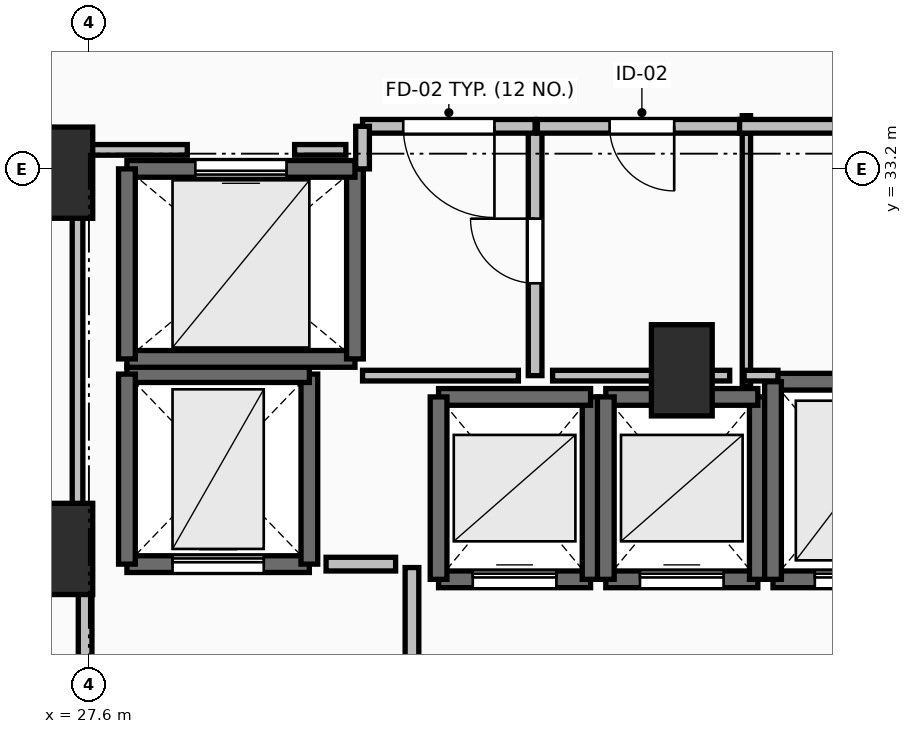
"""IFC4 building model, lengths in metres.
Left out: names, types, materials, properties, quantities, classifications, styles, units other than length and angle.
Written with IfcOpenShell. Run it as: python <this file> out.ifc"""

import sys

from ifc_helpers import new_model, si_unit, direction, frame, frame_2d, origin, origin_2d, place, context, subcontext, project, spatial, rectangle, extrude, element, fill, save


model = new_model("IFC4")
c1 = context("Model", 3, precision=1e-05, world=origin(), true_north=direction((0.0, 1.0)))
c2 = subcontext(c1, "Body", "Model", "MODEL_VIEW")
j1 = project(units=[si_unit("LENGTHUNIT", "METRE"), si_unit("PLANEANGLEUNIT", "RADIAN")], contexts=[c1])
p1 = place(None, origin())
s1 = spatial("IfcSite", under=j1, at=p1, CompositionType="ELEMENT")
p2 = place(p1, origin())
s2 = spatial("IfcBuilding", under=s1, at=p2, CompositionType="ELEMENT")
p3 = place(p2, frame((0.0, 0.0, 19.2)))
s3 = spatial("IfcBuildingStorey", under=s2, at=p3, CompositionType="ELEMENT", Elevation=19.2)
for number, where, z_axis, x_axis in (
    (1, (27.25, 28.2, 0.0), (0.0, 0.0, 1.0), (1.0, 0.0, 0.0)),
    (2, (27.25, 33.15, 0.0), (0.0, 0.0, 1.0), (1.0, 0.0, 0.0)),
    (3, (35.4, 30.55, 0.0), (0.0, 0.0, 1.0), (1.0, 0.0, 0.0)),
):
    element("IfcColumn", number, at=place(p3, frame(where, z_axis=z_axis, x_axis=x_axis)), inside=s3, PredefinedType="PILASTER", context=c2, shape_type="SweptSolid", body=[
        extrude(rectangle(XDim=0.8, YDim=1.2, at=origin_2d()), origin(), (0.0, 0.0, 1.0), 4.8),
    ])
p4 = place(p3, frame((32.2, 27.8, 0.0), z_axis=(0.0, 0.0, 1.0), x_axis=(1.0, 0.0, 0.0)))
e4 = element("IfcWall", 4, at=p4, inside=s3, PredefinedType="SOLIDWALL", context=c2, shape_type="SweptSolid", body=[
    extrude(rectangle(XDim=2.0, YDim=0.22, at=frame_2d((1.0, 0.0))), origin(), (0.0, 0.0, 1.0), 4.54),
])
p5 = place(p4, frame((0.45, 0.0, 0.0)))
e5 = element("IfcOpeningElement", 5, at=p5, cuts=e4, PredefinedType="OPENING", context=c2, shape_type="SweptSolid", body=[
    extrude(rectangle(XDim=1.1, YDim=2.2, at=frame_2d((0.55, 1.1))), frame((0.0, 0.125, 0.0), z_axis=(0.0, -1.0, 0.0), x_axis=(1.0, 0.0, 0.0)), (0.0, 0.0, 1.0), 0.25),
])
p6 = place(p3, frame((34.2, 27.8, 0.0), z_axis=(0.0, 0.0, 1.0), x_axis=(0.0, 1.0, 0.0)))
e6 = element("IfcWall", 6, at=p6, inside=s3, PredefinedType="SOLIDWALL", context=c2, shape_type="SweptSolid", body=[
    extrude(rectangle(XDim=2.4, YDim=0.22, at=frame_2d((1.2, 0.0))), origin(), (0.0, 0.0, 1.0), 4.54),
])
p7 = place(p3, frame((34.2, 30.2, 0.0), z_axis=(0.0, 0.0, 1.0), x_axis=(-1.0, 0.0, 0.0)))
e7 = element("IfcWall", 7, at=p7, inside=s3, PredefinedType="SOLIDWALL", context=c2, shape_type="SweptSolid", body=[
    extrude(rectangle(XDim=2.0, YDim=0.22, at=frame_2d((1.0, 0.0))), origin(), (0.0, 0.0, 1.0), 4.54),
])
p8 = place(p3, frame((32.2, 30.2, 0.0), z_axis=(0.0, 0.0, 1.0), x_axis=(0.0, -1.0, 0.0)))
e8 = element("IfcWall", 8, at=p8, inside=s3, PredefinedType="SOLIDWALL", context=c2, shape_type="SweptSolid", body=[
    extrude(rectangle(XDim=2.4, YDim=0.22, at=frame_2d((1.2, 0.0))), origin(), (0.0, 0.0, 1.0), 4.54),
])
p9 = place(p3, frame((34.4, 27.8, 0.0), z_axis=(0.0, 0.0, 1.0), x_axis=(1.0, 0.0, 0.0)))
e9 = element("IfcWall", 9, at=p9, inside=s3, PredefinedType="SOLIDWALL", context=c2, shape_type="SweptSolid", body=[
    extrude(rectangle(XDim=2.0, YDim=0.22, at=frame_2d((1.0, 0.0))), origin(), (0.0, 0.0, 1.0), 4.54),
])
p10 = place(p9, frame((0.45, 0.0, 0.0)))
e10 = element("IfcOpeningElement", 10, at=p10, cuts=e9, PredefinedType="OPENING", context=c2, shape_type="SweptSolid", body=[
    extrude(rectangle(XDim=1.1, YDim=2.2, at=frame_2d((0.55, 1.1))), frame((0.0, 0.125, 0.0), z_axis=(0.0, -1.0, 0.0), x_axis=(1.0, 0.0, 0.0)), (0.0, 0.0, 1.0), 0.25),
])
p11 = place(p3, frame((36.4, 27.8, 0.0), z_axis=(0.0, 0.0, 1.0), x_axis=(0.0, 1.0, 0.0)))
e11 = element("IfcWall", 11, at=p11, inside=s3, PredefinedType="SOLIDWALL", context=c2, shape_type="SweptSolid", body=[
    extrude(rectangle(XDim=2.4, YDim=0.22, at=frame_2d((1.2, 0.0))), origin(), (0.0, 0.0, 1.0), 4.54),
])
p12 = place(p3, frame((36.4, 30.2, 0.0), z_axis=(0.0, 0.0, 1.0), x_axis=(-1.0, 0.0, 0.0)))
e12 = element("IfcWall", 12, at=p12, inside=s3, PredefinedType="SOLIDWALL", context=c2, shape_type="SweptSolid", body=[
    extrude(rectangle(XDim=2.0, YDim=0.22, at=frame_2d((1.0, 0.0))), origin(), (0.0, 0.0, 1.0), 4.54),
])
p13 = place(p3, frame((34.4, 30.2, 0.0), z_axis=(0.0, 0.0, 1.0), x_axis=(0.0, -1.0, 0.0)))
e13 = element("IfcWall", 13, at=p13, inside=s3, PredefinedType="SOLIDWALL", context=c2, shape_type="SweptSolid", body=[
    extrude(rectangle(XDim=2.4, YDim=0.22, at=frame_2d((1.2, 0.0))), origin(), (0.0, 0.0, 1.0), 4.54),
])
p14 = place(p3, frame((36.6, 27.8, 0.0), z_axis=(0.0, 0.0, 1.0), x_axis=(1.0, 0.0, 0.0)))
e14 = element("IfcWall", 14, at=p14, inside=s3, PredefinedType="SOLIDWALL", context=c2, shape_type="SweptSolid", body=[
    extrude(rectangle(XDim=2.2, YDim=0.22, at=frame_2d((1.1, 0.0))), origin(), (0.0, 0.0, 1.0), 4.54),
])
p15 = place(p14, frame((0.55, 0.0, 0.0)))
e15 = element("IfcOpeningElement", 15, at=p15, cuts=e14, PredefinedType="OPENING", context=c2, shape_type="SweptSolid", body=[
    extrude(rectangle(XDim=1.1, YDim=2.2, at=frame_2d((0.55, 1.1))), frame((0.0, 0.125, 0.0), z_axis=(0.0, -1.0, 0.0), x_axis=(1.0, 0.0, 0.0)), (0.0, 0.0, 1.0), 0.25),
])
p16 = place(p3, frame((38.8, 30.4, 0.0), z_axis=(0.0, 0.0, 1.0), x_axis=(-1.0, 0.0, 0.0)))
e16 = element("IfcWall", 16, at=p16, inside=s3, PredefinedType="SOLIDWALL", context=c2, shape_type="SweptSolid", body=[
    extrude(rectangle(XDim=2.2, YDim=0.22, at=frame_2d((1.1, 0.0))), origin(), (0.0, 0.0, 1.0), 4.54),
])
p17 = place(p3, frame((36.6, 30.4, 0.0), z_axis=(0.0, 0.0, 1.0), x_axis=(0.0, -1.0, 0.0)))
e17 = element("IfcWall", 17, at=p17, inside=s3, PredefinedType="SOLIDWALL", context=c2, shape_type="SweptSolid", body=[
    extrude(rectangle(XDim=2.6, YDim=0.22, at=frame_2d((1.3, 0.0))), origin(), (0.0, 0.0, 1.0), 4.54),
])
p18 = place(p3, frame((28.1, 28.0, 0.0), z_axis=(0.0, 0.0, 1.0), x_axis=(1.0, 0.0, 0.0)))
e18 = element("IfcWall", 18, at=p18, inside=s3, PredefinedType="SHEAR", context=c2, shape_type="SweptSolid", body=[
    extrude(rectangle(XDim=2.4, YDim=0.22, at=frame_2d((1.2, 0.0))), origin(), (0.0, 0.0, 1.0), 4.54),
])
p19 = place(p18, frame((0.6, 0.0, 0.0)))
e19 = element("IfcOpeningElement", 19, at=p19, cuts=e18, PredefinedType="OPENING", context=c2, shape_type="SweptSolid", body=[
    extrude(rectangle(XDim=1.2, YDim=2.2, at=frame_2d((0.6, 1.1))), frame((0.0, 0.125, 0.0), z_axis=(0.0, -1.0, 0.0), x_axis=(1.0, 0.0, 0.0)), (0.0, 0.0, 1.0), 0.25),
])
p20 = place(p3, frame((30.5, 28.0, 0.0), z_axis=(0.0, 0.0, 1.0), x_axis=(0.0, 1.0, 0.0)))
e20 = element("IfcWall", 20, at=p20, inside=s3, PredefinedType="SHEAR", context=c2, shape_type="SweptSolid", body=[
    extrude(rectangle(XDim=2.5, YDim=0.22, at=frame_2d((1.25, 0.0))), origin(), (0.0, 0.0, 1.0), 4.54),
])
p21 = place(p3, frame((30.5, 30.5, 0.0), z_axis=(0.0, 0.0, 1.0), x_axis=(-1.0, 0.0, 0.0)))
e21 = element("IfcWall", 21, at=p21, inside=s3, PredefinedType="SHEAR", context=c2, shape_type="SweptSolid", body=[
    extrude(rectangle(XDim=2.4, YDim=0.22, at=frame_2d((1.2, 0.0))), origin(), (0.0, 0.0, 1.0), 4.54),
])
p22 = place(p3, frame((28.1, 30.5, 0.0), z_axis=(0.0, 0.0, 1.0), x_axis=(0.0, -1.0, 0.0)))
e22 = element("IfcWall", 22, at=p22, inside=s3, PredefinedType="SHEAR", context=c2, shape_type="SweptSolid", body=[
    extrude(rectangle(XDim=2.5, YDim=0.22, at=frame_2d((1.25, 0.0))), origin(), (0.0, 0.0, 1.0), 4.54),
])
p23 = place(p3, frame((28.1, 30.7, 0.0), z_axis=(0.0, 0.0, 1.0), x_axis=(1.0, 0.0, 0.0)))
e23 = element("IfcWall", 23, at=p23, inside=s3, PredefinedType="SOLIDWALL", context=c2, shape_type="SweptSolid", body=[
    extrude(rectangle(XDim=3.0, YDim=0.22, at=frame_2d((1.5, 0.0))), origin(), (0.0, 0.0, 1.0), 4.54),
])
p24 = place(p3, frame((31.1, 30.7, 0.0), z_axis=(0.0, 0.0, 1.0), x_axis=(0.0, 1.0, 0.0)))
e24 = element("IfcWall", 24, at=p24, inside=s3, PredefinedType="SOLIDWALL", context=c2, shape_type="SweptSolid", body=[
    extrude(rectangle(XDim=2.5, YDim=0.22, at=frame_2d((1.25, 0.0))), origin(), (0.0, 0.0, 1.0), 4.54),
])
p25 = place(p3, frame((31.1, 33.2, 0.0), z_axis=(0.0, 0.0, 1.0), x_axis=(-1.0, 0.0, 0.0)))
e25 = element("IfcWall", 25, at=p25, inside=s3, PredefinedType="SOLIDWALL", context=c2, shape_type="SweptSolid", body=[
    extrude(rectangle(XDim=3.0, YDim=0.22, at=frame_2d((1.5, 0.0))), origin(), (0.0, 0.0, 1.0), 4.54),
])
p26 = place(p25, frame((0.9, 0.0, 0.0)))
e26 = element("IfcOpeningElement", 26, at=p26, cuts=e25, PredefinedType="OPENING", context=c2, shape_type="SweptSolid", body=[
    extrude(rectangle(XDim=1.2, YDim=2.2, at=frame_2d((0.6, 1.1))), frame((0.0, 0.125, 0.0), z_axis=(0.0, -1.0, 0.0), x_axis=(1.0, 0.0, 0.0)), (0.0, 0.0, 1.0), 0.25),
])
p27 = place(p3, frame((28.1, 33.2, 0.0), z_axis=(0.0, 0.0, 1.0), x_axis=(0.0, -1.0, 0.0)))
e27 = element("IfcWall", 27, at=p27, inside=s3, PredefinedType="SOLIDWALL", context=c2, shape_type="SweptSolid", body=[
    extrude(rectangle(XDim=2.5, YDim=0.22, at=frame_2d((1.25, 0.0))), origin(), (0.0, 0.0, 1.0), 4.54),
])
p28 = place(p3, frame((31.85, 24.045, 0.0), z_axis=(0.0, 0.0, 1.0), x_axis=(0.0, 1.0, 0.0)))
e28 = element("IfcWall", 28, at=p28, inside=s3, PredefinedType="PARTITIONING", context=c2, shape_type="SweptSolid", body=[
    extrude(rectangle(XDim=3.91, YDim=0.18, at=frame_2d((1.955, 0.0))), origin(), (0.0, 0.0, 1.0), 4.54),
])
p29 = place(p28, frame((1.355, 0.0, 0.0)))
e29 = element("IfcOpeningElement", 29, at=p29, cuts=e28, PredefinedType="OPENING", context=c2, shape_type="SweptSolid", body=[
    extrude(rectangle(XDim=1.2, YDim=2.15, at=frame_2d((0.6, 1.075))), frame((0.0, 0.105, 0.0), z_axis=(0.0, -1.0, 0.0), x_axis=(1.0, 0.0, 0.0)), (0.0, 0.0, 1.0), 0.21),
])
p30 = place(p3, frame((27.55, 28.0, 0.0), z_axis=(0.0, 0.0, 1.0), x_axis=(0.0, -1.0, 0.0)))
e30 = element("IfcWall", 30, at=p30, inside=s3, PredefinedType="PARTITIONING", context=c2, shape_type="SweptSolid", body=[
    extrude(rectangle(XDim=4.05, YDim=0.18, at=frame_2d((2.025, 0.0))), origin(), (0.0, 0.0, 1.0), 4.54),
])
p31 = place(p30, frame((1.425, 0.0, 0.0)))
e31 = element("IfcOpeningElement", 31, at=p31, cuts=e30, PredefinedType="OPENING", context=c2, shape_type="SweptSolid", body=[
    extrude(rectangle(XDim=1.2, YDim=2.15, at=frame_2d((0.6, 1.075))), frame((0.0, 0.105, 0.0), z_axis=(0.0, -1.0, 0.0), x_axis=(1.0, 0.0, 0.0)), (0.0, 0.0, 1.0), 0.21),
])
p32 = place(p3, frame((33.47, 30.48, 0.0), z_axis=(0.0, 0.0, 1.0), x_axis=(0.0, 1.0, 0.0)))
e32 = element("IfcWall", 32, at=p32, inside=s3, PredefinedType="PARTITIONING", context=c2, shape_type="SweptSolid", body=[
    extrude(rectangle(XDim=3.28, YDim=0.18, at=frame_2d((1.64, 0.0))), origin(), (0.0, 0.0, 1.0), 4.54),
])
p33 = place(p32, frame((1.215, 0.0, 0.0)))
e33 = element("IfcOpeningElement", 33, at=p33, cuts=e32, PredefinedType="OPENING", context=c2, shape_type="SweptSolid", body=[
    extrude(rectangle(XDim=0.85, YDim=2.1, at=frame_2d((0.425, 1.05))), frame((0.0, 0.105, 0.0), z_axis=(0.0, -1.0, 0.0), x_axis=(1.0, 0.0, 0.0)), (0.0, 0.0, 1.0), 0.21),
])
p34 = place(p3, frame((33.47, 33.76, 0.0), z_axis=(0.0, 0.0, 1.0), x_axis=(-1.0, 0.0, 0.0)))
e34 = element("IfcWall", 34, at=p34, inside=s3, PredefinedType="PARTITIONING", context=c2, shape_type="SweptSolid", body=[
    extrude(rectangle(XDim=2.27, YDim=0.18, at=frame_2d((1.135, 0.0))), origin(), (0.0, 0.0, 1.0), 4.54),
])
p35 = place(p34, frame((0.535, 0.0, 0.0)))
e35 = element("IfcOpeningElement", 35, at=p35, cuts=e34, PredefinedType="OPENING", context=c2, shape_type="SweptSolid", body=[
    extrude(rectangle(XDim=1.2, YDim=2.15, at=frame_2d((0.6, 1.075))), frame((0.0, 0.105, 0.0), z_axis=(0.0, -1.0, 0.0), x_axis=(1.0, 0.0, 0.0)), (0.0, 0.0, 1.0), 0.21),
])
p36 = place(p3, frame((31.2, 33.76, 0.0), z_axis=(0.0, 0.0, 1.0), x_axis=(0.0, -1.0, 0.0)))
e36 = element("IfcWall", 36, at=p36, inside=s3, PredefinedType="PARTITIONING", context=c2, shape_type="SweptSolid", body=[
    extrude(rectangle(XDim=0.56, YDim=0.18, at=frame_2d((0.28, 0.0))), origin(), (0.0, 0.0, 1.0), 4.54),
])
p37 = place(p3, frame((36.25, 30.34, 0.0), z_axis=(0.0, 0.0, 1.0), x_axis=(0.0, 1.0, 0.0)))
e37 = element("IfcWall", 37, at=p37, inside=s3, PredefinedType="PARTITIONING", context=c2, shape_type="SweptSolid", body=[
    extrude(rectangle(XDim=3.56, YDim=0.11, at=frame_2d((1.78, 0.0))), origin(), (0.0, 0.0, 1.0), 3.732),
])
p38 = place(p3, frame((36.25, 33.76, 0.0), z_axis=(0.0, 0.0, 1.0), x_axis=(-1.0, 0.0, 0.0)))
e38 = element("IfcWall", 38, at=p38, inside=s3, PredefinedType="PARTITIONING", context=c2, shape_type="SweptSolid", body=[
    extrude(rectangle(XDim=2.75, YDim=0.18, at=frame_2d((1.375, 0.0))), origin(), (0.0, 0.0, 1.0), 4.54),
])
p39 = place(p38, frame((0.95, 0.0, 0.0)))
e39 = element("IfcOpeningElement", 39, at=p39, cuts=e38, PredefinedType="OPENING", context=c2, shape_type="SweptSolid", body=[
    extrude(rectangle(XDim=0.85, YDim=2.1, at=frame_2d((0.425, 1.05))), frame((0.0, 0.105, 0.0), z_axis=(0.0, -1.0, 0.0), x_axis=(1.0, 0.0, 0.0)), (0.0, 0.0, 1.0), 0.21),
])
p40 = place(p3, frame((39.79, 33.76, 0.0), z_axis=(0.0, 0.0, 1.0), x_axis=(-1.0, 0.0, 0.0)))
e40 = element("IfcWall", 40, at=p40, inside=s3, PredefinedType="PARTITIONING", context=c2, shape_type="SweptSolid", body=[
    extrude(rectangle(XDim=3.63, YDim=0.18, at=frame_2d((1.815, 0.0))), origin(), (0.0, 0.0, 1.0), 4.54),
])
p41 = place(p40, frame((1.39, 0.0, 0.0)))
e41 = element("IfcOpeningElement", 41, at=p41, cuts=e40, PredefinedType="OPENING", context=c2, shape_type="SweptSolid", body=[
    extrude(rectangle(XDim=0.85, YDim=2.1, at=frame_2d((0.425, 1.05))), frame((0.0, 0.105, 0.0), z_axis=(0.0, -1.0, 0.0), x_axis=(1.0, 0.0, 0.0)), (0.0, 0.0, 1.0), 0.21),
])
p42 = place(p3, frame((31.635, 28.0, 0.0), z_axis=(0.0, 0.0, 1.0), x_axis=(-1.0, 0.0, 0.0)))
e42 = element("IfcWall", 42, at=p42, inside=s3, PredefinedType="PARTITIONING", context=c2, shape_type="SweptSolid", body=[
    extrude(rectangle(XDim=0.915, YDim=0.18, at=frame_2d((0.458, 0.0))), origin(), (0.0, 0.0, 1.0), 4.54),
])
p43 = place(p3, frame((31.2, 30.48, 0.0), z_axis=(0.0, 0.0, 1.0), x_axis=(1.0, 0.0, 0.0)))
e43 = element("IfcWall", 43, at=p43, inside=s3, PredefinedType="PARTITIONING", context=c2, shape_type="SweptSolid", body=[
    extrude(rectangle(XDim=2.05, YDim=0.14, at=frame_2d((1.025, 0.0))), origin(), (0.0, 0.0, 1.0), 4.54),
])
p44 = place(p3, frame((33.7, 30.48, 0.0), z_axis=(0.0, 0.0, 1.0), x_axis=(1.0, 0.0, 0.0)))
e44 = element("IfcWall", 44, at=p44, inside=s3, PredefinedType="PARTITIONING", context=c2, shape_type="SweptSolid", body=[
    extrude(rectangle(XDim=2.33, YDim=0.14, at=frame_2d((1.165, 0.0))), origin(), (0.0, 0.0, 1.0), 3.732),
])
p45 = place(p3, frame((36.22, 30.48, 0.0), z_axis=(0.0, 0.0, 1.0), x_axis=(1.0, 0.0, 0.0)))
e45 = element("IfcWall", 45, at=p45, inside=s3, PredefinedType="PARTITIONING", context=c2, shape_type="SweptSolid", body=[
    extrude(rectangle(XDim=0.445, YDim=0.14, at=frame_2d((0.223, 0.0))), origin(), (0.0, 0.0, 1.0), 3.732),
])
p46 = place(p3, frame((27.45, 28.196, 0.0), z_axis=(0.0, 0.0, 1.0), x_axis=(0.0, 1.0, 0.0)))
e46 = element("IfcWall", 46, at=p46, inside=s3, PredefinedType="PARTITIONING", context=c2, shape_type="SweptSolid", body=[
    extrude(rectangle(XDim=5.254, YDim=0.14, at=frame_2d((2.627, 0.0))), origin(), (0.0, 0.0, 1.0), 3.732),
])
p47 = place(p3, frame((27.45, 33.45, 0.0), z_axis=(0.0, 0.0, 1.0), x_axis=(1.0, 0.0, 0.0)))
e47 = element("IfcWall", 47, at=p47, inside=s3, PredefinedType="PARTITIONING", context=c2, shape_type="SweptSolid", body=[
    extrude(rectangle(XDim=1.444, YDim=0.14, at=frame_2d((0.722, 0.0))), origin(), (0.0, 0.0, 1.0), 3.732),
])
p48 = place(p3, frame((30.306, 33.45, 0.0), z_axis=(0.0, 0.0, 1.0), x_axis=(1.0, 0.0, 0.0)))
e48 = element("IfcWall", 48, at=p48, inside=s3, PredefinedType="PARTITIONING", context=c2, shape_type="SweptSolid", body=[
    extrude(rectangle(XDim=0.674, YDim=0.14, at=frame_2d((0.337, 0.0))), origin(), (0.0, 0.0, 1.0), 4.54),
])
p49 = place(p5, origin())
e49 = element("IfcDoor", 49, at=p49, inside=s3, OperationType="SLIDING_TO_LEFT", PredefinedType="DOOR", context=c2, shape_type="SweptSolid", body=[
    extrude(rectangle(XDim=1.1, YDim=2.2, at=frame_2d((0.55, 1.1))), frame((0.0, 0.025, 0.0), z_axis=(0.0, -1.0, 0.0), x_axis=(1.0, 0.0, 0.0)), (0.0, 0.0, 1.0), 0.05),
])
fill(e5, e49)
p50 = place(p10, origin())
e50 = element("IfcDoor", 50, at=p50, inside=s3, OperationType="SLIDING_TO_LEFT", PredefinedType="DOOR", context=c2, shape_type="SweptSolid", body=[
    extrude(rectangle(XDim=1.1, YDim=2.2, at=frame_2d((0.55, 1.1))), frame((0.0, 0.025, 0.0), z_axis=(0.0, -1.0, 0.0), x_axis=(1.0, 0.0, 0.0)), (0.0, 0.0, 1.0), 0.05),
])
fill(e10, e50)
p51 = place(p15, origin())
e51 = element("IfcDoor", 51, at=p51, inside=s3, OperationType="SLIDING_TO_LEFT", PredefinedType="DOOR", context=c2, shape_type="SweptSolid", body=[
    extrude(rectangle(XDim=1.1, YDim=2.2, at=frame_2d((0.55, 1.1))), frame((0.0, 0.025, 0.0), z_axis=(0.0, -1.0, 0.0), x_axis=(1.0, 0.0, 0.0)), (0.0, 0.0, 1.0), 0.05),
])
fill(e15, e51)
p52 = place(p19, origin())
e52 = element("IfcDoor", 52, at=p52, inside=s3, OperationType="SLIDING_TO_LEFT", PredefinedType="DOOR", context=c2, shape_type="SweptSolid", body=[
    extrude(rectangle(XDim=1.2, YDim=2.2, at=frame_2d((0.6, 1.1))), frame((0.0, 0.025, 0.0), z_axis=(0.0, -1.0, 0.0), x_axis=(1.0, 0.0, 0.0)), (0.0, 0.0, 1.0), 0.05),
])
fill(e19, e52)
p53 = place(p26, origin())
e53 = element("IfcDoor", 53, at=p53, inside=s3, OperationType="SLIDING_TO_LEFT", PredefinedType="DOOR", context=c2, shape_type="SweptSolid", body=[
    extrude(rectangle(XDim=1.2, YDim=2.2, at=frame_2d((0.6, 1.1))), frame((0.0, 0.025, 0.0), z_axis=(0.0, -1.0, 0.0), x_axis=(1.0, 0.0, 0.0)), (0.0, 0.0, 1.0), 0.05),
])
fill(e26, e53)
p54 = place(p33, origin())
e54 = element("IfcDoor", 54, at=p54, inside=s3, OperationType="SINGLE_SWING_RIGHT", PredefinedType="DOOR", context=c2, shape_type="SweptSolid", body=[
    extrude(rectangle(XDim=0.85, YDim=2.1, at=frame_2d((0.425, 1.05))), frame((0.0, 0.025, 0.0), z_axis=(0.0, -1.0, 0.0), x_axis=(1.0, 0.0, 0.0)), (0.0, 0.0, 1.0), 0.05),
])
fill(e33, e54)
p55 = place(p35, origin())
e55 = element("IfcDoor", 55, at=p55, inside=s3, OperationType="SINGLE_SWING_LEFT", PredefinedType="DOOR", context=c2, shape_type="SweptSolid", body=[
    extrude(rectangle(XDim=1.2, YDim=2.15, at=frame_2d((0.6, 1.075))), frame((0.0, 0.025, 0.0), z_axis=(0.0, -1.0, 0.0), x_axis=(1.0, 0.0, 0.0)), (0.0, 0.0, 1.0), 0.05),
])
fill(e35, e55)
p56 = place(p39, origin())
e56 = element("IfcDoor", 56, at=p56, inside=s3, OperationType="SINGLE_SWING_LEFT", PredefinedType="DOOR", context=c2, shape_type="SweptSolid", body=[
    extrude(rectangle(XDim=0.85, YDim=2.1, at=frame_2d((0.425, 1.05))), frame((0.0, 0.025, 0.0), z_axis=(0.0, -1.0, 0.0), x_axis=(1.0, 0.0, 0.0)), (0.0, 0.0, 1.0), 0.05),
])
fill(e39, e56)
save(model, sys.argv[1])
